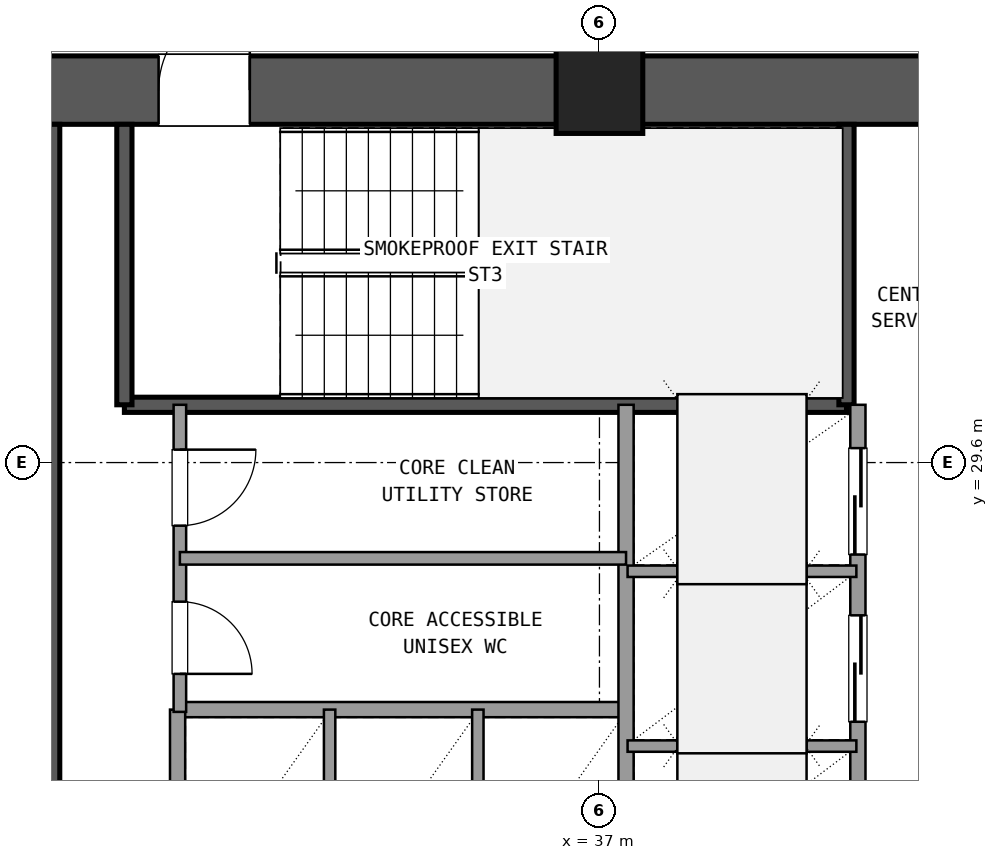
"""IFC4 building model, lengths in metres.
Left out: names, types, materials, properties, quantities, classifications, styles, units other than length and angle.
Written with IfcOpenShell. Run it as: python <this file> out.ifc"""

import sys

from ifc_helpers import new_model, si_unit, direction, frame, frame_2d, origin, origin_2d, place, context, subcontext, project, spatial, rectangle, extrude, element, fill, save


model = new_model("IFC4")
c1 = context("Model", 3, precision=1e-05, world=origin(), true_north=direction((0.0, 1.0)))
c2 = subcontext(c1, "Body", "Model", "MODEL_VIEW")
j1 = project(units=[si_unit("LENGTHUNIT", "METRE"), si_unit("PLANEANGLEUNIT", "RADIAN")], contexts=[c1])
p1 = place(None, origin())
s1 = spatial("IfcSite", under=j1, at=p1, CompositionType="ELEMENT")
p2 = place(p1, origin())
s2 = spatial("IfcBuilding", under=s1, at=p2, CompositionType="ELEMENT")
p3 = place(p2, frame((0.0, 0.0, 38.34)))
s3 = spatial("IfcBuildingStorey", under=s2, at=p3, CompositionType="ELEMENT", Elevation=38.34)
p4 = place(p3, frame((37.0, 34.5, 0.0), z_axis=(0.0, 0.0, 1.0), x_axis=(1.0, 0.0, 0.0)))
e1 = element("IfcColumn", 1, at=p4, inside=s3, PredefinedType="COLUMN", context=c2, shape_type="SweptSolid", body=[
    extrude(rectangle(XDim=1.14, YDim=1.14, at=origin_2d()), origin(), (0.0, 0.0, 1.0), 3.6),
])
p5 = place(p3, frame((47.635, 34.5, 0.0), z_axis=(0.0, 0.0, 1.0), x_axis=(-1.0, 0.0, 0.0)))
e2 = element("IfcWall", 2, at=p5, inside=s3, PredefinedType="SHEAR", context=c2, shape_type="SweptSolid", body=[
    extrude(rectangle(XDim=10.07, YDim=0.9, at=frame_2d((5.035, 0.0))), origin(), (0.0, 0.0, 1.0), 3.32),
])
p6 = place(p5, frame((4.535, 0.0, 0.0)))
e3 = element("IfcOpeningElement", 3, at=p6, cuts=e2, PredefinedType="OPENING", context=c2, shape_type="SweptSolid", body=[
    extrude(rectangle(XDim=1.6, YDim=2.2, at=frame_2d((0.8, 1.1))), frame((0.0, 0.46, 0.0), z_axis=(0.0, -1.0, 0.0), x_axis=(1.0, 0.0, 0.0)), (0.0, 0.0, 1.0), 0.92),
])
p7 = place(p3, frame((36.435, 34.5, 0.0), z_axis=(0.0, 0.0, 1.0), x_axis=(-1.0, 0.0, 0.0)))
e4 = element("IfcWall", 4, at=p7, inside=s3, PredefinedType="SHEAR", context=c2, shape_type="SweptSolid", body=[
    extrude(rectangle(XDim=10.07, YDim=0.9, at=frame_2d((5.035, 0.0))), origin(), (0.0, 0.0, 1.0), 3.32),
])
p8 = place(p7, frame((4.035, 0.0, 0.0)))
e5 = element("IfcOpeningElement", 5, at=p8, cuts=e4, PredefinedType="OPENING", context=c2, shape_type="SweptSolid", body=[
    extrude(rectangle(XDim=1.2, YDim=2.15, at=frame_2d((0.6, 1.075))), frame((0.0, 0.46, 0.0), z_axis=(0.0, -1.0, 0.0), x_axis=(1.0, 0.0, 0.0)), (0.0, 0.0, 1.0), 0.92),
])
p9 = place(p3, frame((29.8, 24.65, 0.0), z_axis=(0.0, 0.0, 1.0), x_axis=(0.0, 1.0, 0.0)))
e6 = element("IfcWall", 6, at=p9, inside=s3, PredefinedType="SHEAR", context=c2, shape_type="SweptSolid", body=[
    extrude(rectangle(XDim=9.4, YDim=0.2, at=frame_2d((4.7, 0.0))), origin(), (0.0, 0.0, 1.0), 3.32),
])
p10 = place(p3, frame((30.75, 30.36, 0.0), z_axis=(0.0, 0.0, 1.0), x_axis=(1.0, 0.0, 0.0)))
e7 = element("IfcWall", 7, at=p10, inside=s3, PredefinedType="SHEAR", context=c2, shape_type="SweptSolid", body=[
    extrude(rectangle(XDim=9.5, YDim=0.2, at=frame_2d((4.75, 0.0))), origin(), (0.0, 0.0, 1.0), 3.32),
])
for number, where, z_axis, x_axis in (
    (8, (30.75, 30.36, 0.0), (0.0, 0.0, 1.0), (0.0, 1.0, 0.0)),
    (9, (40.25, 30.36, 0.0), (0.0, 0.0, 1.0), (0.0, 1.0, 0.0)),
):
    element("IfcWall", number, at=place(p3, frame(where, z_axis=z_axis, x_axis=x_axis)), inside=s3, PredefinedType="SHEAR", context=c2, shape_type="SweptSolid", body=[
        extrude(rectangle(XDim=3.69, YDim=0.2, at=frame_2d((1.845, 0.0))), origin(), (0.0, 0.0, 1.0), 3.32),
    ])
p11 = place(p3, frame((31.45, 26.35, 0.0), z_axis=(0.0, 0.0, 1.0), x_axis=(1.0, 0.0, 0.0)))
e10 = element("IfcWall", 10, at=p11, inside=s3, PredefinedType="SOLIDWALL", context=c2, shape_type="SweptSolid", body=[
    extrude(rectangle(XDim=5.9, YDim=0.2, at=frame_2d((2.95, 0.0))), origin(), (0.0, 0.0, 1.0), 2.61),
])
p12 = place(p3, frame((31.45, 23.54, 0.0), z_axis=(0.0, 0.0, 1.0), x_axis=(0.0, 1.0, 0.0)))
e11 = element("IfcWall", 11, at=p12, inside=s3, PredefinedType="SOLIDWALL", context=c2, shape_type="SweptSolid", body=[
    extrude(rectangle(XDim=2.81, YDim=0.2, at=frame_2d((1.405, 0.0))), origin(), (0.0, 0.0, 1.0), 2.61),
])
for number, where, z_axis, x_axis in (
    (12, (33.45, 23.54, 0.0), (0.0, 0.0, 1.0), (0.0, 1.0, 0.0)),
    (13, (35.4, 23.54, 0.0), (0.0, 0.0, 1.0), (0.0, 1.0, 0.0)),
):
    element("IfcWall", number, at=place(p3, frame(where, z_axis=z_axis, x_axis=x_axis)), inside=s3, PredefinedType="PARTITIONING", context=c2, shape_type="SweptSolid", body=[
        extrude(rectangle(XDim=2.81, YDim=0.15, at=frame_2d((1.405, 0.0))), origin(), (0.0, 0.0, 1.0), 2.61),
    ])
p13 = place(p3, frame((37.35, 23.54, 0.0), z_axis=(0.0, 0.0, 1.0), x_axis=(0.0, 1.0, 0.0)))
e14 = element("IfcWall", 14, at=p13, inside=s3, PredefinedType="SOLIDWALL", context=c2, shape_type="SweptSolid", body=[
    extrude(rectangle(XDim=6.82, YDim=0.2, at=frame_2d((3.41, 0.0))), origin(), (0.0, 0.0, 1.0), 2.61),
])
p14 = place(p3, frame((40.4, 23.54, 0.0), z_axis=(0.0, 0.0, 1.0), x_axis=(0.0, 1.0, 0.0)))
e15 = element("IfcWall", 15, at=p14, inside=s3, PredefinedType="SOLIDWALL", context=c2, shape_type="SweptSolid", body=[
    extrude(rectangle(XDim=6.82, YDim=0.2, at=frame_2d((3.41, 0.0))), origin(), (0.0, 0.0, 1.0), 2.61),
])
p15 = place(p14, frame((0.35, 0.0, 0.0)))
e16 = element("IfcOpeningElement", 16, at=p15, cuts=e15, PredefinedType="OPENING", context=c2, shape_type="SweptSolid", body=[
    extrude(rectangle(XDim=1.4, YDim=2.2, at=frame_2d((0.7, 1.1))), frame((0.0, 0.11, 0.0), z_axis=(0.0, -1.0, 0.0), x_axis=(1.0, 0.0, 0.0)), (0.0, 0.0, 1.0), 0.22),
])
p16 = place(p14, frame((2.65, 0.0, 0.0)))
e17 = element("IfcOpeningElement", 17, at=p16, cuts=e15, PredefinedType="OPENING", context=c2, shape_type="SweptSolid", body=[
    extrude(rectangle(XDim=1.4, YDim=2.2, at=frame_2d((0.7, 1.1))), frame((0.0, 0.11, 0.0), z_axis=(0.0, -1.0, 0.0), x_axis=(1.0, 0.0, 0.0)), (0.0, 0.0, 1.0), 0.22),
])
p17 = place(p14, frame((4.85, 0.0, 0.0)))
e18 = element("IfcOpeningElement", 18, at=p17, cuts=e15, PredefinedType="OPENING", context=c2, shape_type="SweptSolid", body=[
    extrude(rectangle(XDim=1.4, YDim=2.2, at=frame_2d((0.7, 1.1))), frame((0.0, 0.11, 0.0), z_axis=(0.0, -1.0, 0.0), x_axis=(1.0, 0.0, 0.0)), (0.0, 0.0, 1.0), 0.22),
])
for number, where, z_axis, x_axis in (
    (19, (37.37, 25.87, 0.0), (0.0, 0.0, 1.0), (1.0, 0.0, 0.0)),
    (20, (37.37, 28.17, 0.0), (0.0, 0.0, 1.0), (1.0, 0.0, 0.0)),
):
    element("IfcWall", number, at=place(p3, frame(where, z_axis=z_axis, x_axis=x_axis)), inside=s3, PredefinedType="PARTITIONING", context=c2, shape_type="SweptSolid", body=[
        extrude(rectangle(XDim=3.01, YDim=0.15, at=frame_2d((1.505, 0.0))), origin(), (0.0, 0.0, 1.0), 2.61),
    ])
p18 = place(p3, frame((31.48, 26.32, 0.0), z_axis=(0.0, 0.0, 1.0), x_axis=(0.0, 1.0, 0.0)))
e21 = element("IfcWall", 21, at=p18, inside=s3, PredefinedType="PLUMBINGWALL", context=c2, shape_type="SweptSolid", body=[
    extrude(rectangle(XDim=4.04, YDim=0.165, at=frame_2d((2.02, 0.0))), origin(), (0.0, 0.0, 1.0), 2.61),
])
p19 = place(p18, frame((0.5, 0.0, 0.0)))
e22 = element("IfcOpeningElement", 22, at=p19, cuts=e21, PredefinedType="OPENING", context=c2, shape_type="SweptSolid", body=[
    extrude(rectangle(XDim=0.95, YDim=2.1, at=frame_2d((0.475, 1.05))), frame((0.0, 0.093, 0.0), z_axis=(0.0, -1.0, 0.0), x_axis=(1.0, 0.0, 0.0)), (0.0, 0.0, 1.0), 0.185),
])
p20 = place(p18, frame((2.45, 0.0, 0.0)))
e23 = element("IfcOpeningElement", 23, at=p20, cuts=e21, PredefinedType="OPENING", context=c2, shape_type="SweptSolid", body=[
    extrude(rectangle(XDim=1.0, YDim=2.15, at=frame_2d((0.5, 1.075))), frame((0.0, 0.093, 0.0), z_axis=(0.0, -1.0, 0.0), x_axis=(1.0, 0.0, 0.0)), (0.0, 0.0, 1.0), 0.185),
])
p21 = place(p3, frame((31.48, 28.34, 0.0), z_axis=(0.0, 0.0, 1.0), x_axis=(1.0, 0.0, 0.0)))
e24 = element("IfcWall", 24, at=p21, inside=s3, PredefinedType="PLUMBINGWALL", context=c2, shape_type="SweptSolid", body=[
    extrude(rectangle(XDim=5.87, YDim=0.165, at=frame_2d((2.935, 0.0))), origin(), (0.0, 0.0, 1.0), 2.61),
])
p22 = place(p3, frame((37.0, 34.95, 0.0), z_axis=(0.0, 0.0, 1.0), x_axis=(0.0, 1.0, 0.0)))
e25 = element("IfcWall", 25, at=p22, inside=s3, PredefinedType="PARTITIONING", context=c2, shape_type="SweptSolid", body=[
    extrude(rectangle(XDim=2.7, YDim=0.18, at=frame_2d((1.35, 0.0))), origin(), (0.0, 0.0, 1.0), 2.61),
])
p23 = place(p22, frame((0.35, 0.0, 0.0)))
e26 = element("IfcOpeningElement", 26, at=p23, cuts=e25, PredefinedType="OPENING", context=c2, shape_type="SweptSolid", body=[
    extrude(rectangle(XDim=2.0, YDim=2.2, at=frame_2d((1.0, 1.1))), frame((0.0, 0.1, 0.0), z_axis=(0.0, -1.0, 0.0), x_axis=(1.0, 0.0, 0.0)), (0.0, 0.0, 1.0), 0.2),
])
p24 = place(p8, frame((1.2, 0.0, 0.0), z_axis=(0.0, 0.0, 1.0), x_axis=(-1.0, 0.0, 0.0)))
e27 = element("IfcDoor", 27, at=p24, inside=s3, OperationType="SINGLE_SWING_LEFT", PredefinedType="DOOR", context=c2, shape_type="SweptSolid", body=[
    extrude(rectangle(XDim=1.2, YDim=2.15, at=frame_2d((0.6, 1.075))), frame((0.0, 0.025, 0.0), z_axis=(0.0, -1.0, 0.0), x_axis=(1.0, 0.0, 0.0)), (0.0, 0.0, 1.0), 0.05),
])
fill(e5, e27)
p25 = place(p16, origin())
e28 = element("IfcDoor", 28, at=p25, inside=s3, OperationType="SLIDING_TO_LEFT", PredefinedType="DOOR", context=c2, shape_type="SweptSolid", body=[
    extrude(rectangle(XDim=1.4, YDim=2.2, at=frame_2d((0.7, 1.1))), frame((0.0, 0.025, 0.0), z_axis=(0.0, -1.0, 0.0), x_axis=(1.0, 0.0, 0.0)), (0.0, 0.0, 1.0), 0.05),
])
fill(e17, e28)
p26 = place(p17, origin())
e29 = element("IfcDoor", 29, at=p26, inside=s3, OperationType="SLIDING_TO_RIGHT", PredefinedType="DOOR", context=c2, shape_type="SweptSolid", body=[
    extrude(rectangle(XDim=1.4, YDim=2.2, at=frame_2d((0.7, 1.1))), frame((0.0, 0.025, 0.0), z_axis=(0.0, -1.0, 0.0), x_axis=(1.0, 0.0, 0.0)), (0.0, 0.0, 1.0), 0.05),
])
fill(e18, e29)
p27 = place(p19, frame((0.95, 0.0, 0.0), z_axis=(0.0, 0.0, 1.0), x_axis=(-1.0, 0.0, 0.0)))
e30 = element("IfcDoor", 30, at=p27, inside=s3, OperationType="SINGLE_SWING_LEFT", PredefinedType="DOOR", context=c2, shape_type="SweptSolid", body=[
    extrude(rectangle(XDim=0.95, YDim=2.1, at=frame_2d((0.475, 1.05))), frame((0.0, 0.025, 0.0), z_axis=(0.0, -1.0, 0.0), x_axis=(1.0, 0.0, 0.0)), (0.0, 0.0, 1.0), 0.05),
])
fill(e22, e30)
p28 = place(p20, frame((1.0, 0.0, 0.0), z_axis=(0.0, 0.0, 1.0), x_axis=(-1.0, 0.0, 0.0)))
e31 = element("IfcDoor", 31, at=p28, inside=s3, OperationType="SINGLE_SWING_RIGHT", PredefinedType="DOOR", context=c2, shape_type="SweptSolid", body=[
    extrude(rectangle(XDim=1.0, YDim=2.15, at=frame_2d((0.5, 1.075))), frame((0.0, 0.025, 0.0), z_axis=(0.0, -1.0, 0.0), x_axis=(1.0, 0.0, 0.0)), (0.0, 0.0, 1.0), 0.05),
])
fill(e23, e31)
save(model, sys.argv[1])
